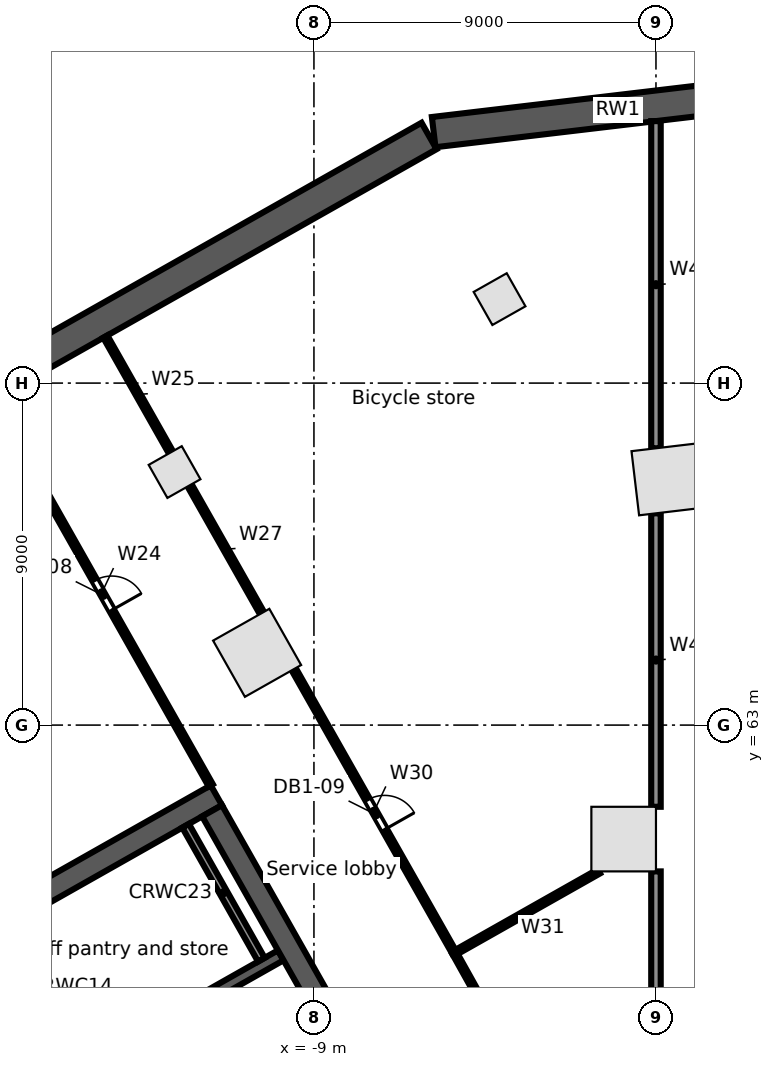
"""IFC4 building model, lengths in metres.
Left out: names, types, materials, properties, quantities, classifications, styles, units other than length and angle.
Written with IfcOpenShell. Run it as: python <this file> out.ifc"""

import sys

from ifc_helpers import new_model, si_unit, direction, frame, frame_2d, origin, origin_2d, place, context, subcontext, project, spatial, rectangle, extrude, element, fill, save


model = new_model("IFC4")
c1 = context("Model", 3, precision=1e-05, world=origin(), true_north=direction((0.0, 1.0)))
c2 = subcontext(c1, "Body", "Model", "MODEL_VIEW")
j1 = project(units=[si_unit("LENGTHUNIT", "METRE"), si_unit("PLANEANGLEUNIT", "RADIAN")], contexts=[c1])
p1 = place(None, origin())
s1 = spatial("IfcSite", under=j1, at=p1, CompositionType="ELEMENT")
p2 = place(p1, origin())
s2 = spatial("IfcBuilding", under=s1, at=p2, CompositionType="ELEMENT")
p3 = place(p2, frame((0.0, 0.0, -4.8)))
s3 = spatial("IfcBuildingStorey", under=s2, at=p3, CompositionType="ELEMENT", Elevation=-4.8)
p4 = place(p3, frame((3.848, 79.753, 0.0), z_axis=(0.0, 0.0, 1.0), x_axis=(-0.993067076287, -0.117549062072, 0.0)))
e1 = element("IfcWall", 1, at=p4, inside=s3, PredefinedType="SOLIDWALL", context=c2, shape_type="SweptSolid", body=[
    extrude(rectangle(XDim=9.766, YDim=0.8, at=frame_2d((4.883, 0.0))), origin(), (0.0, 0.0, 1.0), 4.8),
])
p5 = place(p3, frame((-5.971, 78.503, 0.0), z_axis=(0.0, 0.0, 1.0), x_axis=(-0.870356741611, -0.492421711882, 0.0)))
e2 = element("IfcWall", 2, at=p5, inside=s3, PredefinedType="SOLIDWALL", context=c2, shape_type="SweptSolid", body=[
    extrude(rectangle(XDim=70.604, YDim=0.8, at=frame_2d((35.302, 0.0))), origin(), (0.0, 0.0, 1.0), 4.8),
])
for number, where, z_axis, x_axis in (
    (3, (0.3, 69.464, 0.0), (0.0, 0.0, 1.0), (-0.993, -0.118, 0.0)),
    (4, (-10.495, 64.902, 0.0), (0.0, 0.0, 1.0), (-0.87, -0.492, 0.0)),
    (5, (-0.85, 60.0, 0.0), (0.0, 0.0, 1.0), (0.0, 1.0, 0.0)),
):
    element("IfcColumn", number, at=place(p3, frame(where, z_axis=z_axis, x_axis=x_axis)), inside=s3, PredefinedType="COLUMN", context=c2, shape_type="SweptSolid", body=[
        extrude(rectangle(XDim=1.7, YDim=1.7, at=origin_2d()), origin(), (0.0, 0.0, 1.0), 4.8),
    ])
for number, where, z_axis, x_axis in (
    (6, (-4.116, 74.21, 0.0), (0.0, 0.0, 1.0), (-0.87, -0.492, 0.0)),
    (7, (-12.667, 69.659, 0.0), (0.0, 0.0, 1.0), (-0.87, -0.492, 0.0)),
):
    element("IfcColumn", number, at=place(p3, frame(where, z_axis=z_axis, x_axis=x_axis)), inside=s3, PredefinedType="COLUMN", context=c2, shape_type="SweptSolid", body=[
        extrude(rectangle(XDim=1.0, YDim=1.0, at=origin_2d()), origin(), (0.0, 0.0, 1.0), 4.8),
    ])
p6 = place(p3, frame((-15.618, 53.691, 0.0), z_axis=(0.0, 0.0, 1.0), x_axis=(0.870356769198, 0.492421663121, 0.0)))
e8 = element("IfcWall", 8, at=p6, inside=s3, PredefinedType="SOLIDWALL", context=c2, shape_type="SweptSolid", body=[
    extrude(rectangle(XDim=6.6, YDim=0.3, at=frame_2d((3.3, 0.0))), origin(), (0.0, 0.0, 1.0), 4.35),
])
p7 = place(p6, frame((2.6, 0.0, 0.0)))
e9 = element("IfcOpeningElement", 9, at=p7, cuts=e8, PredefinedType="OPENING", context=c2, shape_type="SweptSolid", body=[
    extrude(rectangle(XDim=0.9, YDim=2.1, at=frame_2d((0.45, 1.05))), frame((0.0, 0.16, 0.0), z_axis=(0.0, -1.0, 0.0), x_axis=(1.0, 0.0, 0.0)), (0.0, 0.0, 1.0), 0.32),
])
p8 = place(p3, frame((-24.623, 53.767, 0.0), z_axis=(0.0, 0.0, 1.0), x_axis=(0.870356627484, 0.492421913601, 0.0)))
e10 = element("IfcWall", 10, at=p8, inside=s3, PredefinedType="SOLIDWALL", context=c2, shape_type="SweptSolid", body=[
    extrude(rectangle(XDim=15.0, YDim=0.6, at=frame_2d((7.5, 0.0))), origin(), (0.0, 0.0, 1.0), 4.35),
])
p9 = place(p3, frame((-17.686, 57.347, 0.0), z_axis=(0.0, 0.0, 1.0), x_axis=(0.492420746998, -0.870357287513, 0.0)))
e11 = element("IfcWall", 11, at=p9, inside=s3, PredefinedType="SOLIDWALL", context=c2, shape_type="SweptSolid", body=[
    extrude(rectangle(XDim=4.05, YDim=0.3, at=frame_2d((2.025, 0.0))), origin(), (0.0, 0.0, 1.0), 4.35),
])
p10 = place(p3, frame((-12.377, 60.351, 0.0), z_axis=(0.0, 0.0, 1.0), x_axis=(0.492440575896, -0.870346068648, 0.0)))
e12 = element("IfcWall", 12, at=p10, inside=s3, PredefinedType="SOLIDWALL", context=c2, shape_type="SweptSolid", body=[
    extrude(rectangle(XDim=4.05, YDim=0.2, at=frame_2d((2.025, 0.0))), origin(), (0.0, 0.0, 1.0), 4.35),
])
p11 = place(p3, frame((-11.681, 60.744, 0.0), z_axis=(0.0, 0.0, 1.0), x_axis=(0.492426772896, -0.870353878221, 0.0)))
e13 = element("IfcWall", 13, at=p11, inside=s3, PredefinedType="SOLIDWALL", context=c2, shape_type="SweptSolid", body=[
    extrude(rectangle(XDim=12.8, YDim=0.6, at=frame_2d((6.4, 0.0))), origin(), (0.0, 0.0, 1.0), 4.35),
])
p12 = place(p3, frame((-17.449, 71.549, 0.0), z_axis=(0.0, 0.0, 1.0), x_axis=(0.492408863594, -0.870364010661, 0.0)))
e14 = element("IfcWall", 14, at=p12, inside=s3, PredefinedType="PARTITIONING", context=c2, shape_type="SweptSolid", body=[
    extrude(rectangle(XDim=11.645, YDim=0.125, at=frame_2d((5.822, 0.0))), origin(), (0.0, 0.0, 1.0), 3.63),
])
p13 = place(p12, frame((5.45, 0.0, 0.0)))
e15 = element("IfcOpeningElement", 15, at=p13, cuts=e14, PredefinedType="OPENING", context=c2, shape_type="SweptSolid", body=[
    extrude(rectangle(XDim=0.9, YDim=2.1, at=frame_2d((0.45, 1.05))), frame((0.0, 0.073, 0.0), z_axis=(0.0, -1.0, 0.0), x_axis=(1.0, 0.0, 0.0)), (0.0, 0.0, 1.0), 0.145),
])
p14 = place(p3, frame((-14.49, 73.224, 0.0), z_axis=(0.0, 0.0, 1.0), x_axis=(0.492785561685, -0.870150785896, 0.0)))
e16 = element("IfcWall", 16, at=p14, inside=s3, PredefinedType="PARTITIONING", context=c2, shape_type="SweptSolid", body=[
    extrude(rectangle(XDim=3.501, YDim=0.125, at=frame_2d((1.75, 0.0))), origin(), (0.0, 0.0, 1.0), 4.35),
])
p15 = place(p3, frame((-12.272, 69.308, 0.0), z_axis=(0.0, 0.0, 1.0), x_axis=(0.492928006212, -0.870070101022, 0.0)))
e17 = element("IfcWall", 17, at=p15, inside=s3, PredefinedType="PARTITIONING", context=c2, shape_type="SweptSolid", body=[
    extrude(rectangle(XDim=3.861, YDim=0.125, at=frame_2d((1.93, 0.0))), origin(), (0.0, 0.0, 1.0), 3.412),
])
p16 = place(p3, frame((-9.532, 64.47, 0.0), z_axis=(0.0, 0.0, 1.0), x_axis=(0.492882680299, -0.870095778326, 0.0)))
e18 = element("IfcWall", 18, at=p16, inside=s3, PredefinedType="PARTITIONING", context=c2, shape_type="SweptSolid", body=[
    extrude(rectangle(XDim=8.584, YDim=0.125, at=frame_2d((4.292, 0.0))), origin(), (0.0, 0.0, 1.0), 3.412),
])
p17 = place(p16, frame((3.95, 0.0, 0.0)))
e19 = element("IfcOpeningElement", 19, at=p17, cuts=e18, PredefinedType="OPENING", context=c2, shape_type="SweptSolid", body=[
    extrude(rectangle(XDim=0.9, YDim=2.1, at=frame_2d((0.45, 1.05))), frame((0.0, 0.073, 0.0), z_axis=(0.0, -1.0, 0.0), x_axis=(1.0, 0.0, 0.0)), (0.0, 0.0, 1.0), 0.145),
])
p18 = place(p3, frame((-5.301, 57.001, 0.0), z_axis=(0.0, 0.0, 1.0), x_axis=(0.870403402545, 0.492339229433, 0.0)))
e20 = element("IfcWall", 20, at=p18, inside=s3, PredefinedType="PARTITIONING", context=c2, shape_type="SweptSolid", body=[
    extrude(rectangle(XDim=4.365, YDim=0.125, at=frame_2d((2.182, 0.0))), origin(), (0.0, 0.0, 1.0), 3.412),
])
p19 = place(p3, frame((-5.301, 57.001, 0.0), z_axis=(0.0, 0.0, 1.0), x_axis=(0.487215056149, -0.873282021492, 0.0)))
e21 = element("IfcWall", 21, at=p19, inside=s3, PredefinedType="PARTITIONING", context=c2, shape_type="SweptSolid", body=[
    extrude(rectangle(XDim=8.395, YDim=0.125, at=frame_2d((4.197, 0.0))), origin(), (0.0, 0.0, 1.0), 4.35),
])
p20 = place(p19, frame((3.7, 0.0, 0.0)))
e22 = element("IfcOpeningElement", 22, at=p20, cuts=e21, PredefinedType="OPENING", context=c2, shape_type="SweptSolid", body=[
    extrude(rectangle(XDim=0.9, YDim=2.1, at=frame_2d((0.45, 1.05))), frame((0.0, 0.073, 0.0), z_axis=(0.0, -1.0, 0.0), x_axis=(1.0, 0.0, 0.0)), (0.0, 0.0, 1.0), 0.145),
])
p21 = place(p3, frame((0.0, 49.726, 0.0), z_axis=(0.0, 0.0, 1.0), x_axis=(0.0, 1.0, 0.0)))
e23 = element("IfcWall", 23, at=p21, inside=s3, PredefinedType="PARTITIONING", context=c2, shape_type="SweptSolid", body=[
    extrude(rectangle(XDim=9.424, YDim=0.25, at=frame_2d((4.712, 0.0))), origin(), (0.0, 0.0, 1.0), 4.35),
])
p22 = place(p3, frame((0.0, 60.85, 0.0), z_axis=(0.0, 0.0, 1.0), x_axis=(0.0, 1.0, 0.0)))
e24 = element("IfcWall", 24, at=p22, inside=s3, PredefinedType="PARTITIONING", context=c2, shape_type="SweptSolid", body=[
    extrude(rectangle(XDim=7.723, YDim=0.25, at=frame_2d((3.861, 0.0))), origin(), (0.0, 0.0, 1.0), 3.63),
])
p23 = place(p3, frame((0.0, 70.285, 0.0), z_axis=(0.0, 0.0, 1.0), x_axis=(0.0, 1.0, 0.0)))
e25 = element("IfcWall", 25, at=p23, inside=s3, PredefinedType="PARTITIONING", context=c2, shape_type="SweptSolid", body=[
    extrude(rectangle(XDim=8.609, YDim=0.25, at=frame_2d((4.305, 0.0))), origin(), (0.0, 0.0, 1.0), 3.718),
])
p24 = place(p13, origin())
e26 = element("IfcDoor", 26, at=p24, inside=s3, OperationType="SINGLE_SWING_RIGHT", PredefinedType="DOOR", context=c2, shape_type="SweptSolid", body=[
    extrude(rectangle(XDim=0.9, YDim=2.1, at=frame_2d((0.45, 1.05))), frame((0.0, 0.025, 0.0), z_axis=(0.0, -1.0, 0.0), x_axis=(1.0, 0.0, 0.0)), (0.0, 0.0, 1.0), 0.05),
])
fill(e15, e26)
p25 = place(p17, origin())
e27 = element("IfcDoor", 27, at=p25, inside=s3, OperationType="SINGLE_SWING_RIGHT", PredefinedType="DOOR", context=c2, shape_type="SweptSolid", body=[
    extrude(rectangle(XDim=0.9, YDim=2.1, at=frame_2d((0.45, 1.05))), frame((0.0, 0.025, 0.0), z_axis=(0.0, -1.0, 0.0), x_axis=(1.0, 0.0, 0.0)), (0.0, 0.0, 1.0), 0.05),
])
fill(e19, e27)
save(model, sys.argv[1])
